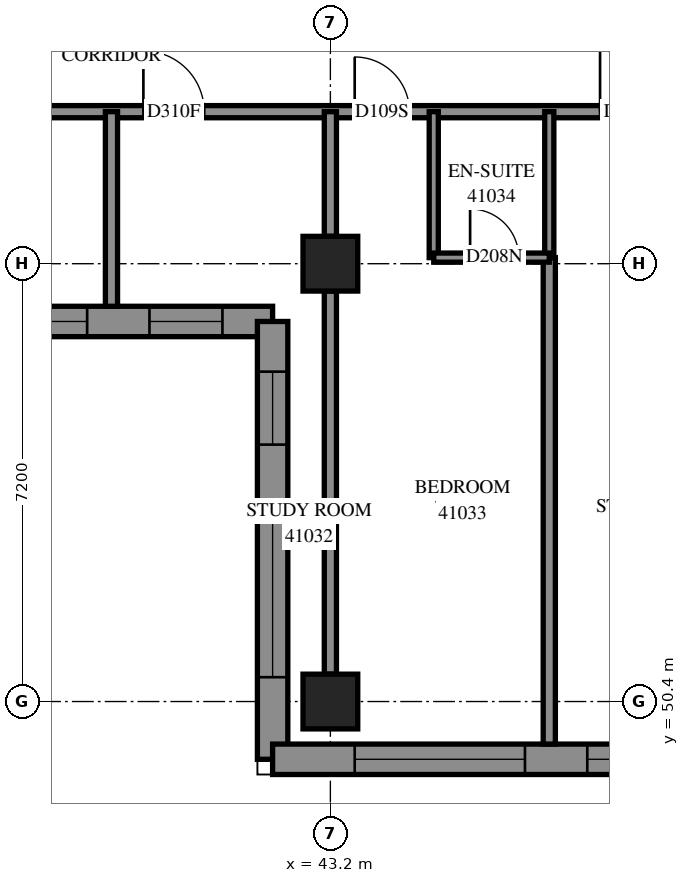
"""IFC4 building model, lengths in metres.
Left out: names, types, materials, properties, quantities, classifications, styles, units other than length and angle.
Written with IfcOpenShell. Run it as: python <this file> out.ifc"""

import sys

from ifc_helpers import new_model, si_unit, direction, frame, frame_2d, origin, origin_2d, place, context, subcontext, project, spatial, polyline, rectangle, outline, extrude, element, fill, save


model = new_model("IFC4")
c1 = context("Model", 3, precision=1e-05, world=origin(), true_north=direction((0.0, 1.0)))
c2 = subcontext(c1, "Body", "Model", "MODEL_VIEW")
j1 = project(units=[si_unit("LENGTHUNIT", "METRE"), si_unit("PLANEANGLEUNIT", "RADIAN")], contexts=[c1])
p1 = place(None, origin())
s1 = spatial("IfcSite", under=j1, at=p1, CompositionType="ELEMENT")
p2 = place(p1, origin())
s2 = spatial("IfcBuilding", under=s1, at=p2, CompositionType="ELEMENT")
p3 = place(p2, frame((0.0, 0.0, 152.4)))
s3 = spatial("IfcBuildingStorey", under=s2, at=p3, CompositionType="ELEMENT", Elevation=152.4)
for number, where, z_axis, x_axis in (
    (1, (43.2, 50.4, 0.0), (0.0, 0.0, 1.0), (1.0, 0.0, 0.0)),
    (2, (43.2, 57.6, 0.0), (0.0, 0.0, 1.0), (1.0, 0.0, 0.0)),
):
    element("IfcColumn", number, at=place(p3, frame(where, z_axis=z_axis, x_axis=x_axis)), inside=s3, PredefinedType="COLUMN", context=c2, shape_type="SweptSolid", body=[
        extrude(rectangle(XDim=0.9, YDim=0.9, at=origin_2d()), origin(), (0.0, 0.0, 1.0), 3.1),
    ])
p4 = place(p3, frame((35.05, 56.65, 0.0), z_axis=(0.0, 0.0, 1.0), x_axis=(1.0, 0.0, 0.0)))
e3 = element("IfcWall", 3, at=p4, inside=s3, PredefinedType="SOLIDWALL", context=c2, shape_type="SweptSolid", body=[
    extrude(outline(polyline([(-0.25, -0.25), (6.95, -0.25), (7.45, 0.25), (0.25, 0.25), (-0.25, -0.25)])), origin(), (0.0, 0.0, 1.0), 3.1),
])
p5 = place(p4, frame((1.35, 0.0, 0.45)))
e4 = element("IfcOpeningElement", 4, at=p5, cuts=e3, PredefinedType="OPENING", context=c2, shape_type="SweptSolid", body=[
    extrude(rectangle(XDim=2.8, YDim=2.5, at=frame_2d((1.4, 1.25))), frame((0.0, 0.26, 0.0), z_axis=(0.0, -1.0, 0.0), x_axis=(1.0, 0.0, 0.0)), (0.0, 0.0, 1.0), 0.52),
])
p6 = place(p4, frame((5.175, 0.0, 0.45)))
e5 = element("IfcOpeningElement", 5, at=p6, cuts=e3, PredefinedType="OPENING", context=c2, shape_type="SweptSolid", body=[
    extrude(rectangle(XDim=1.2, YDim=2.5, at=frame_2d((0.6, 1.25))), frame((0.0, 0.26, 0.0), z_axis=(0.0, -1.0, 0.0), x_axis=(1.0, 0.0, 0.0)), (0.0, 0.0, 1.0), 0.52),
])
p7 = place(p3, frame((42.25, 56.65, 0.0), z_axis=(0.0, 0.0, 1.0), x_axis=(0.0, -1.0, 0.0)))
e6 = element("IfcWall", 6, at=p7, inside=s3, PredefinedType="SOLIDWALL", context=c2, shape_type="SweptSolid", body=[
    extrude(outline(polyline([(0.25, -0.25), (7.45, -0.25), (6.95, 0.25), (-0.25, 0.25), (0.25, -0.25)])), origin(), (0.0, 0.0, 1.0), 3.1),
])
p8 = place(p7, frame((3.05, 0.0, 0.45)))
e7 = element("IfcOpeningElement", 7, at=p8, cuts=e6, PredefinedType="OPENING", context=c2, shape_type="SweptSolid", body=[
    extrude(rectangle(XDim=2.8, YDim=2.5, at=frame_2d((1.4, 1.25))), frame((0.0, 0.26, 0.0), z_axis=(0.0, -1.0, 0.0), x_axis=(1.0, 0.0, 0.0)), (0.0, 0.0, 1.0), 0.52),
])
p9 = place(p7, frame((0.825, 0.0, 0.45)))
e8 = element("IfcOpeningElement", 8, at=p9, cuts=e6, PredefinedType="OPENING", context=c2, shape_type="SweptSolid", body=[
    extrude(rectangle(XDim=1.2, YDim=2.5, at=frame_2d((0.6, 1.25))), frame((0.0, 0.26, 0.0), z_axis=(0.0, -1.0, 0.0), x_axis=(1.0, 0.0, 0.0)), (0.0, 0.0, 1.0), 0.52),
])
p10 = place(p3, frame((42.25, 49.45, 0.0), z_axis=(0.0, 0.0, 1.0), x_axis=(1.0, 0.0, 0.0)))
e9 = element("IfcWall", 9, at=p10, inside=s3, PredefinedType="SOLIDWALL", context=c2, shape_type="SweptSolid", body=[
    extrude(outline(polyline([(-0.25, -0.25), (6.95, -0.25), (7.45, 0.25), (0.25, 0.25), (-0.25, -0.25)])), origin(), (0.0, 0.0, 1.0), 3.1),
])
p11 = place(p10, frame((1.35, 0.0, 0.45)))
e10 = element("IfcOpeningElement", 10, at=p11, cuts=e9, PredefinedType="OPENING", context=c2, shape_type="SweptSolid", body=[
    extrude(rectangle(XDim=2.8, YDim=2.5, at=frame_2d((1.4, 1.25))), frame((0.0, 0.26, 0.0), z_axis=(0.0, -1.0, 0.0), x_axis=(1.0, 0.0, 0.0)), (0.0, 0.0, 1.0), 0.52),
])
p12 = place(p10, frame((5.175, 0.0, 0.45)))
e11 = element("IfcOpeningElement", 11, at=p12, cuts=e9, PredefinedType="OPENING", context=c2, shape_type="SweptSolid", body=[
    extrude(rectangle(XDim=1.2, YDim=2.5, at=frame_2d((0.6, 1.25))), frame((0.0, 0.26, 0.0), z_axis=(0.0, -1.0, 0.0), x_axis=(1.0, 0.0, 0.0)), (0.0, 0.0, 1.0), 0.52),
])
p13 = place(p3, frame((36.0, 60.1, 0.0), z_axis=(0.0, 0.0, 1.0), x_axis=(1.0, 0.0, 0.0)))
e12 = element("IfcWall", 12, at=p13, inside=s3, PredefinedType="PARTITIONING", context=c2, shape_type="SweptSolid", body=[
    extrude(rectangle(XDim=16.9, YDim=0.2, at=frame_2d((8.45, 0.0))), origin(), (0.0, 0.0, 1.0), 3.1),
])
p14 = place(p13, frame((4.125, 0.0, 0.0)))
e13 = element("IfcOpeningElement", 13, at=p14, cuts=e12, PredefinedType="OPENING", context=c2, shape_type="SweptSolid", body=[
    extrude(rectangle(XDim=1.0, YDim=2.1, at=frame_2d((0.5, 1.05))), frame((0.0, 0.11, 0.0), z_axis=(0.0, -1.0, 0.0), x_axis=(1.0, 0.0, 0.0)), (0.0, 0.0, 1.0), 0.22),
])
p15 = place(p13, frame((7.6, 0.0, 0.0)))
e14 = element("IfcOpeningElement", 14, at=p15, cuts=e12, PredefinedType="OPENING", context=c2, shape_type="SweptSolid", body=[
    extrude(rectangle(XDim=0.9, YDim=2.1, at=frame_2d((0.45, 1.05))), frame((0.0, 0.11, 0.0), z_axis=(0.0, -1.0, 0.0), x_axis=(1.0, 0.0, 0.0)), (0.0, 0.0, 1.0), 0.22),
])
p16 = place(p13, frame((11.635, 0.0, 0.0)))
e15 = element("IfcOpeningElement", 15, at=p16, cuts=e12, PredefinedType="OPENING", context=c2, shape_type="SweptSolid", body=[
    extrude(rectangle(XDim=1.0, YDim=2.1, at=frame_2d((0.5, 1.05))), frame((0.0, 0.11, 0.0), z_axis=(0.0, -1.0, 0.0), x_axis=(1.0, 0.0, 0.0)), (0.0, 0.0, 1.0), 0.22),
])
p17 = place(p13, frame((15.652, 0.0, 0.0)))
e16 = element("IfcOpeningElement", 16, at=p17, cuts=e12, PredefinedType="OPENING", context=c2, shape_type="SweptSolid", body=[
    extrude(rectangle(XDim=1.0, YDim=2.1, at=frame_2d((0.5, 1.05))), frame((0.0, 0.11, 0.0), z_axis=(0.0, -1.0, 0.0), x_axis=(1.0, 0.0, 0.0)), (0.0, 0.0, 1.0), 0.22),
])
p18 = place(p3, frame((46.8, 49.7, 0.0), z_axis=(0.0, 0.0, 1.0), x_axis=(0.0, 1.0, 0.0)))
e17 = element("IfcWall", 17, at=p18, inside=s3, PredefinedType="PARTITIONING", context=c2, shape_type="SweptSolid", body=[
    extrude(rectangle(XDim=8.0, YDim=0.2, at=frame_2d((4.0, 0.0))), origin(), (0.0, 0.0, 1.0), 3.1),
])
p19 = place(p3, frame((43.2, 50.85, 0.0), z_axis=(0.0, 0.0, 1.0), x_axis=(0.0, 1.0, 0.0)))
e18 = element("IfcWall", 18, at=p19, inside=s3, PredefinedType="PARTITIONING", context=c2, shape_type="SweptSolid", body=[
    extrude(rectangle(XDim=6.3, YDim=0.2, at=frame_2d((3.15, 0.0))), origin(), (0.0, 0.0, 1.0), 2.6),
])
p20 = place(p3, frame((39.6, 56.9, 0.0), z_axis=(0.0, 0.0, 1.0), x_axis=(0.0, 1.0, 0.0)))
e19 = element("IfcWall", 19, at=p20, inside=s3, PredefinedType="PARTITIONING", context=c2, shape_type="SweptSolid", body=[
    extrude(rectangle(XDim=3.2, YDim=0.2, at=frame_2d((1.6, 0.0))), origin(), (0.0, 0.0, 1.0), 3.1),
])
for number, where, z_axis, x_axis in (
    (20, (44.9, 57.7, 0.0), (0.0, 0.0, 1.0), (0.0, 1.0, 0.0)),
    (21, (46.8, 57.7, 0.0), (0.0, 0.0, 1.0), (0.0, 1.0, 0.0)),
):
    element("IfcWall", number, at=place(p3, frame(where, z_axis=z_axis, x_axis=x_axis)), inside=s3, PredefinedType="PARTITIONING", context=c2, shape_type="SweptSolid", body=[
        extrude(rectangle(XDim=2.4, YDim=0.15, at=frame_2d((1.2, 0.0))), origin(), (0.0, 0.0, 1.0), 3.1),
    ])
p21 = place(p3, frame((43.2, 58.05, 0.0), z_axis=(0.0, 0.0, 1.0), x_axis=(0.0, 1.0, 0.0)))
e22 = element("IfcWall", 22, at=p21, inside=s3, PredefinedType="PARTITIONING", context=c2, shape_type="SweptSolid", body=[
    extrude(rectangle(XDim=2.05, YDim=0.2, at=frame_2d((1.025, 0.0))), origin(), (0.0, 0.0, 1.0), 3.1),
])
p22 = place(p3, frame((44.9, 57.7, 0.0), z_axis=(0.0, 0.0, 1.0), x_axis=(1.0, 0.0, 0.0)))
e23 = element("IfcWall", 23, at=p22, inside=s3, PredefinedType="PARTITIONING", context=c2, shape_type="SweptSolid", body=[
    extrude(rectangle(XDim=1.9, YDim=0.15, at=frame_2d((0.95, 0.0))), origin(), (0.0, 0.0, 1.0), 3.1),
])
p23 = place(p22, frame((0.598, 0.0, 0.0)))
e24 = element("IfcOpeningElement", 24, at=p23, cuts=e23, PredefinedType="OPENING", context=c2, shape_type="SweptSolid", body=[
    extrude(rectangle(XDim=0.8, YDim=2.1, at=frame_2d((0.4, 1.05))), frame((0.0, 0.085, 0.0), z_axis=(0.0, -1.0, 0.0), x_axis=(1.0, 0.0, 0.0)), (0.0, 0.0, 1.0), 0.17),
])
p24 = place(p5, origin())
e25 = element("IfcWindow", 25, at=p24, inside=s3, PartitioningType="SINGLE_PANEL", PredefinedType="WINDOW", context=c2, shape_type="SweptSolid", body=[
    extrude(rectangle(XDim=2.8, YDim=2.5, at=frame_2d((1.4, 1.25))), frame((0.0, 0.18, 0.0), z_axis=(0.0, -1.0, 0.0), x_axis=(1.0, 0.0, 0.0)), (0.0, 0.0, 1.0), 0.06),
])
fill(e4, e25)
p25 = place(p6, origin())
e26 = element("IfcWindow", 26, at=p25, inside=s3, PartitioningType="SINGLE_PANEL", PredefinedType="WINDOW", context=c2, shape_type="SweptSolid", body=[
    extrude(rectangle(XDim=1.2, YDim=2.5, at=frame_2d((0.6, 1.25))), frame((0.0, 0.18, 0.0), z_axis=(0.0, -1.0, 0.0), x_axis=(1.0, 0.0, 0.0)), (0.0, 0.0, 1.0), 0.06),
])
fill(e5, e26)
p26 = place(p8, origin())
e27 = element("IfcWindow", 27, at=p26, inside=s3, PartitioningType="SINGLE_PANEL", PredefinedType="WINDOW", context=c2, shape_type="SweptSolid", body=[
    extrude(rectangle(XDim=2.8, YDim=2.5, at=frame_2d((1.4, 1.25))), frame((0.0, 0.18, 0.0), z_axis=(0.0, -1.0, 0.0), x_axis=(1.0, 0.0, 0.0)), (0.0, 0.0, 1.0), 0.06),
])
fill(e7, e27)
p27 = place(p9, origin())
e28 = element("IfcWindow", 28, at=p27, inside=s3, PartitioningType="SINGLE_PANEL", PredefinedType="WINDOW", context=c2, shape_type="SweptSolid", body=[
    extrude(rectangle(XDim=1.2, YDim=2.5, at=frame_2d((0.6, 1.25))), frame((0.0, 0.18, 0.0), z_axis=(0.0, -1.0, 0.0), x_axis=(1.0, 0.0, 0.0)), (0.0, 0.0, 1.0), 0.06),
])
fill(e8, e28)
p28 = place(p11, origin())
e29 = element("IfcWindow", 29, at=p28, inside=s3, PartitioningType="SINGLE_PANEL", PredefinedType="WINDOW", context=c2, shape_type="SweptSolid", body=[
    extrude(rectangle(XDim=2.8, YDim=2.5, at=frame_2d((1.4, 1.25))), frame((0.0, 0.18, 0.0), z_axis=(0.0, -1.0, 0.0), x_axis=(1.0, 0.0, 0.0)), (0.0, 0.0, 1.0), 0.06),
])
fill(e10, e29)
p29 = place(p12, origin())
e30 = element("IfcWindow", 30, at=p29, inside=s3, PartitioningType="SINGLE_PANEL", PredefinedType="WINDOW", context=c2, shape_type="SweptSolid", body=[
    extrude(rectangle(XDim=1.2, YDim=2.5, at=frame_2d((0.6, 1.25))), frame((0.0, 0.18, 0.0), z_axis=(0.0, -1.0, 0.0), x_axis=(1.0, 0.0, 0.0)), (0.0, 0.0, 1.0), 0.06),
])
fill(e11, e30)
p30 = place(p14, origin())
e31 = element("IfcDoor", 31, at=p30, inside=s3, OperationType="SINGLE_SWING_RIGHT", PredefinedType="DOOR", context=c2, shape_type="SweptSolid", body=[
    extrude(rectangle(XDim=1.0, YDim=2.1, at=frame_2d((0.5, 1.05))), frame((0.0, 0.025, 0.0), z_axis=(0.0, -1.0, 0.0), x_axis=(1.0, 0.0, 0.0)), (0.0, 0.0, 1.0), 0.05),
])
fill(e13, e31)
p31 = place(p15, origin())
e32 = element("IfcDoor", 32, at=p31, inside=s3, OperationType="SINGLE_SWING_LEFT", PredefinedType="DOOR", context=c2, shape_type="SweptSolid", body=[
    extrude(rectangle(XDim=0.9, YDim=2.1, at=frame_2d((0.45, 1.05))), frame((0.0, 0.025, 0.0), z_axis=(0.0, -1.0, 0.0), x_axis=(1.0, 0.0, 0.0)), (0.0, 0.0, 1.0), 0.05),
])
fill(e14, e32)
p32 = place(p23, origin())
e33 = element("IfcDoor", 33, at=p32, inside=s3, OperationType="SINGLE_SWING_RIGHT", PredefinedType="DOOR", context=c2, shape_type="SweptSolid", body=[
    extrude(rectangle(XDim=0.8, YDim=2.1, at=frame_2d((0.4, 1.05))), frame((0.0, 0.025, 0.0), z_axis=(0.0, -1.0, 0.0), x_axis=(1.0, 0.0, 0.0)), (0.0, 0.0, 1.0), 0.05),
])
fill(e24, e33)
p33 = place(p16, origin())
e34 = element("IfcDoor", 34, at=p33, inside=s3, OperationType="SINGLE_SWING_RIGHT", PredefinedType="DOOR", context=c2, shape_type="SweptSolid", body=[
    extrude(rectangle(XDim=1.0, YDim=2.1, at=frame_2d((0.5, 1.05))), frame((0.0, 0.025, 0.0), z_axis=(0.0, -1.0, 0.0), x_axis=(1.0, 0.0, 0.0)), (0.0, 0.0, 1.0), 0.05),
])
fill(e15, e34)
save(model, sys.argv[1])
